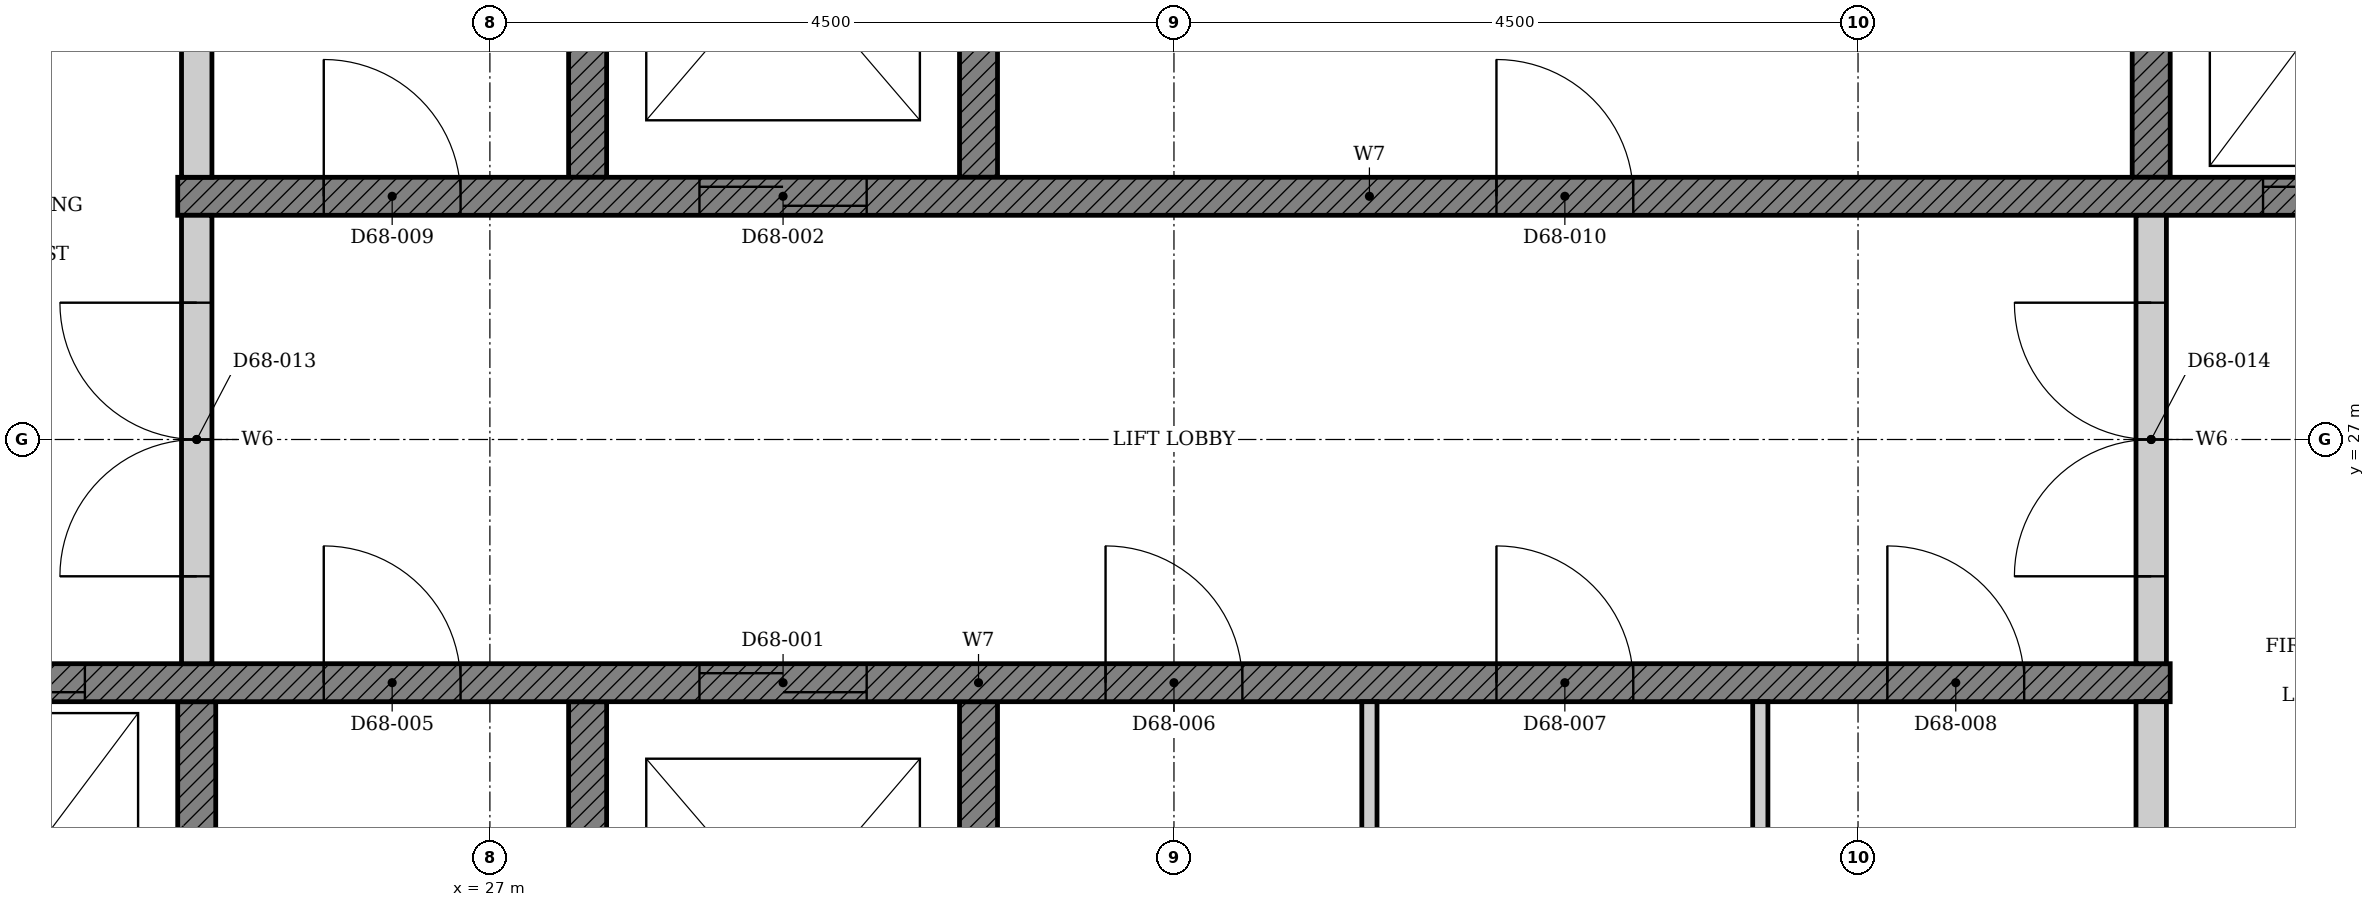
"""IFC4 building model, lengths in metres.
Left out: names, types, materials, properties, quantities, classifications, styles, units other than length and angle.
Written with IfcOpenShell. Run it as: python <this file> out.ifc"""

import sys

from ifc_helpers import new_model, si_unit, direction, frame, frame_2d, origin, place, context, subcontext, project, spatial, polyline, rectangle, outline, extrude, element, fill, save


model = new_model("IFC4")
c1 = context("Model", 3, precision=1e-05, world=origin(), true_north=direction((0.0, 1.0)))
c2 = subcontext(c1, "Body", "Model", "MODEL_VIEW")
j1 = project(units=[si_unit("LENGTHUNIT", "METRE"), si_unit("PLANEANGLEUNIT", "RADIAN")], contexts=[c1])
p1 = place(None, origin())
s1 = spatial("IfcSite", under=j1, at=p1, CompositionType="ELEMENT")
p2 = place(p1, origin())
s2 = spatial("IfcBuilding", under=s1, at=p2, CompositionType="ELEMENT")
p3 = place(p2, frame((0.0, 0.0, 267.5)))
s3 = spatial("IfcBuildingStorey", under=s2, at=p3, CompositionType="ELEMENT", Elevation=267.5)
p4 = place(p3, origin())
e1 = element("IfcWall", 1, at=p4, inside=s3, PredefinedType="SHEAR", context=c2, shape_type="SweptSolid", body=[
    extrude(outline(polyline([(22.375, 22.35), (25.197, 22.35), (25.197, 25.275), (24.947, 25.275), (24.947, 22.65), (22.625, 22.65), (22.625, 25.275), (22.375, 25.275), (22.375, 22.35)])), origin(), (0.0, 0.0, 1.0), 3.4),
])
p5 = place(p3, origin())
e2 = element("IfcWall", 2, at=p5, inside=s3, PredefinedType="SHEAR", context=c2, shape_type="SweptSolid", body=[
    extrude(outline(polyline([(27.518, 22.35), (30.339, 22.35), (30.339, 25.275), (30.089, 25.275), (30.089, 22.65), (27.768, 22.65), (27.768, 25.275), (27.518, 25.275), (27.518, 22.35)])), origin(), (0.0, 0.0, 1.0), 3.4),
])
p6 = place(p3, origin())
e3 = element("IfcWall", 3, at=p6, inside=s3, PredefinedType="SHEAR", context=c2, shape_type="SweptSolid", body=[
    extrude(outline(polyline([(27.518, 28.725), (27.768, 28.725), (27.768, 31.35), (30.089, 31.35), (30.089, 28.725), (30.339, 28.725), (30.339, 31.65), (27.518, 31.65), (27.518, 28.725)])), origin(), (0.0, 0.0, 1.0), 3.4),
])
p7 = place(p3, origin())
e4 = element("IfcWall", 4, at=p7, inside=s3, PredefinedType="SHEAR", context=c2, shape_type="SweptSolid", body=[
    extrude(outline(polyline([(37.803, 28.725), (38.053, 28.725), (38.053, 31.35), (40.375, 31.35), (40.375, 28.725), (40.625, 28.725), (40.625, 31.65), (37.803, 31.65), (37.803, 28.725)])), origin(), (0.0, 0.0, 1.0), 3.4),
])
p8 = place(p3, frame((22.375, 25.4, 0.0), z_axis=(0.0, 0.0, 1.0), x_axis=(1.0, 0.0, 0.0)))
e5 = element("IfcWall", 5, at=p8, inside=s3, PredefinedType="SHEAR", context=c2, shape_type="SweptSolid", body=[
    extrude(rectangle(XDim=15.678, YDim=0.25, at=frame_2d((7.839, 0.0))), origin(), (0.0, 0.0, 1.0), 3.4),
])
p9 = place(p8, frame((6.004, 0.0, 0.0)))
e6 = element("IfcOpeningElement", 6, at=p9, cuts=e5, PredefinedType="OPENING", context=c2, shape_type="SweptSolid", body=[
    extrude(rectangle(XDim=1.1, YDim=2.1, at=frame_2d((0.55, 1.05))), frame((0.0, 0.135, 0.0), z_axis=(0.0, -1.0, 0.0), x_axis=(1.0, 0.0, 0.0)), (0.0, 0.0, 1.0), 0.27),
])
p10 = place(p8, frame((0.861, 0.0, 0.0)))
e7 = element("IfcOpeningElement", 7, at=p10, cuts=e5, PredefinedType="OPENING", context=c2, shape_type="SweptSolid", body=[
    extrude(rectangle(XDim=1.1, YDim=2.1, at=frame_2d((0.55, 1.05))), frame((0.0, 0.135, 0.0), z_axis=(0.0, -1.0, 0.0), x_axis=(1.0, 0.0, 0.0)), (0.0, 0.0, 1.0), 0.27),
])
p11 = place(p8, frame((3.532, 0.0, 0.0)))
e8 = element("IfcOpeningElement", 8, at=p11, cuts=e5, PredefinedType="OPENING", context=c2, shape_type="SweptSolid", body=[
    extrude(rectangle(XDim=0.9, YDim=2.1, at=frame_2d((0.45, 1.05))), frame((0.0, 0.135, 0.0), z_axis=(0.0, -1.0, 0.0), x_axis=(1.0, 0.0, 0.0)), (0.0, 0.0, 1.0), 0.27),
])
p12 = place(p8, frame((8.675, 0.0, 0.0)))
e9 = element("IfcOpeningElement", 9, at=p12, cuts=e5, PredefinedType="OPENING", context=c2, shape_type="SweptSolid", body=[
    extrude(rectangle(XDim=0.9, YDim=2.1, at=frame_2d((0.45, 1.05))), frame((0.0, 0.135, 0.0), z_axis=(0.0, -1.0, 0.0), x_axis=(1.0, 0.0, 0.0)), (0.0, 0.0, 1.0), 0.27),
])
p13 = place(p8, frame((11.246, 0.0, 0.0)))
e10 = element("IfcOpeningElement", 10, at=p13, cuts=e5, PredefinedType="OPENING", context=c2, shape_type="SweptSolid", body=[
    extrude(rectangle(XDim=0.9, YDim=2.1, at=frame_2d((0.45, 1.05))), frame((0.0, 0.135, 0.0), z_axis=(0.0, -1.0, 0.0), x_axis=(1.0, 0.0, 0.0)), (0.0, 0.0, 1.0), 0.27),
])
p14 = place(p8, frame((13.818, 0.0, 0.0)))
e11 = element("IfcOpeningElement", 11, at=p14, cuts=e5, PredefinedType="OPENING", context=c2, shape_type="SweptSolid", body=[
    extrude(rectangle(XDim=0.9, YDim=2.1, at=frame_2d((0.45, 1.05))), frame((0.0, 0.135, 0.0), z_axis=(0.0, -1.0, 0.0), x_axis=(1.0, 0.0, 0.0)), (0.0, 0.0, 1.0), 0.27),
])
p15 = place(p3, frame((24.947, 28.6, 0.0), z_axis=(0.0, 0.0, 1.0), x_axis=(1.0, 0.0, 0.0)))
e12 = element("IfcWall", 12, at=p15, inside=s3, PredefinedType="SHEAR", context=c2, shape_type="SweptSolid", body=[
    extrude(rectangle(XDim=15.678, YDim=0.25, at=frame_2d((7.839, 0.0))), origin(), (0.0, 0.0, 1.0), 3.4),
])
p16 = place(p15, frame((3.432, 0.0, 0.0)))
e13 = element("IfcOpeningElement", 13, at=p16, cuts=e12, PredefinedType="OPENING", context=c2, shape_type="SweptSolid", body=[
    extrude(rectangle(XDim=1.1, YDim=2.1, at=frame_2d((0.55, 1.05))), frame((0.0, 0.135, 0.0), z_axis=(0.0, -1.0, 0.0), x_axis=(1.0, 0.0, 0.0)), (0.0, 0.0, 1.0), 0.27),
])
p17 = place(p15, frame((13.718, 0.0, 0.0)))
e14 = element("IfcOpeningElement", 14, at=p17, cuts=e12, PredefinedType="OPENING", context=c2, shape_type="SweptSolid", body=[
    extrude(rectangle(XDim=1.1, YDim=2.1, at=frame_2d((0.55, 1.05))), frame((0.0, 0.135, 0.0), z_axis=(0.0, -1.0, 0.0), x_axis=(1.0, 0.0, 0.0)), (0.0, 0.0, 1.0), 0.27),
])
p18 = place(p15, frame((0.961, 0.0, 0.0)))
e15 = element("IfcOpeningElement", 15, at=p18, cuts=e12, PredefinedType="OPENING", context=c2, shape_type="SweptSolid", body=[
    extrude(rectangle(XDim=0.9, YDim=2.1, at=frame_2d((0.45, 1.05))), frame((0.0, 0.135, 0.0), z_axis=(0.0, -1.0, 0.0), x_axis=(1.0, 0.0, 0.0)), (0.0, 0.0, 1.0), 0.27),
])
p19 = place(p15, frame((8.675, 0.0, 0.0)))
e16 = element("IfcOpeningElement", 16, at=p19, cuts=e12, PredefinedType="OPENING", context=c2, shape_type="SweptSolid", body=[
    extrude(rectangle(XDim=0.9, YDim=2.1, at=frame_2d((0.45, 1.05))), frame((0.0, 0.135, 0.0), z_axis=(0.0, -1.0, 0.0), x_axis=(1.0, 0.0, 0.0)), (0.0, 0.0, 1.0), 0.27),
])
p20 = place(p3, frame((37.928, 22.65, 0.0), z_axis=(0.0, 0.0, 1.0), x_axis=(0.0, 1.0, 0.0)))
e17 = element("IfcWall", 17, at=p20, inside=s3, PredefinedType="PARTITIONING", context=c2, shape_type="SweptSolid", body=[
    extrude(rectangle(XDim=2.625, YDim=0.2, at=frame_2d((1.312, 0.0))), origin(), (0.0, 0.0, 1.0), 3.4),
])
for number, where, z_axis, x_axis in (
    (18, (32.786, 22.65, 0.0), (0.0, 0.0, 1.0), (0.0, 1.0, 0.0)),
    (19, (35.357, 22.65, 0.0), (0.0, 0.0, 1.0), (0.0, 1.0, 0.0)),
):
    element("IfcWall", number, at=place(p3, frame(where, z_axis=z_axis, x_axis=x_axis)), inside=s3, PredefinedType="PARTITIONING", context=c2, shape_type="SweptSolid", body=[
        extrude(rectangle(XDim=2.625, YDim=0.1, at=frame_2d((1.312, 0.0))), origin(), (0.0, 0.0, 1.0), 3.4),
    ])
p21 = place(p3, frame((25.072, 28.725, 0.0), z_axis=(0.0, 0.0, 1.0), x_axis=(0.0, 1.0, 0.0)))
e20 = element("IfcWall", 20, at=p21, inside=s3, PredefinedType="PARTITIONING", context=c2, shape_type="SweptSolid", body=[
    extrude(rectangle(XDim=2.625, YDim=0.2, at=frame_2d((1.312, 0.0))), origin(), (0.0, 0.0, 1.0), 3.4),
])
p22 = place(p3, frame((25.072, 25.525, 0.0), z_axis=(0.0, 0.0, 1.0), x_axis=(0.0, 1.0, 0.0)))
e21 = element("IfcWall", 21, at=p22, inside=s3, PredefinedType="PARTITIONING", context=c2, shape_type="SweptSolid", body=[
    extrude(rectangle(XDim=2.95, YDim=0.2, at=frame_2d((1.475, 0.0))), origin(), (0.0, 0.0, 1.0), 3.4),
])
p23 = place(p22, frame((0.575, 0.0, 0.0)))
e22 = element("IfcOpeningElement", 22, at=p23, cuts=e21, PredefinedType="OPENING", context=c2, shape_type="SweptSolid", body=[
    extrude(rectangle(XDim=1.8, YDim=2.1, at=frame_2d((0.9, 1.05))), frame((0.0, 0.11, 0.0), z_axis=(0.0, -1.0, 0.0), x_axis=(1.0, 0.0, 0.0)), (0.0, 0.0, 1.0), 0.22),
])
p24 = place(p3, frame((37.928, 25.525, 0.0), z_axis=(0.0, 0.0, 1.0), x_axis=(0.0, 1.0, 0.0)))
e23 = element("IfcWall", 23, at=p24, inside=s3, PredefinedType="PARTITIONING", context=c2, shape_type="SweptSolid", body=[
    extrude(rectangle(XDim=2.95, YDim=0.2, at=frame_2d((1.475, 0.0))), origin(), (0.0, 0.0, 1.0), 3.4),
])
p25 = place(p24, frame((0.575, 0.0, 0.0)))
e24 = element("IfcOpeningElement", 24, at=p25, cuts=e23, PredefinedType="OPENING", context=c2, shape_type="SweptSolid", body=[
    extrude(rectangle(XDim=1.8, YDim=2.1, at=frame_2d((0.9, 1.05))), frame((0.0, 0.11, 0.0), z_axis=(0.0, -1.0, 0.0), x_axis=(1.0, 0.0, 0.0)), (0.0, 0.0, 1.0), 0.22),
])
p26 = place(p9, origin())
e25 = element("IfcDoor", 25, at=p26, inside=s3, OperationType="DOUBLE_DOOR_SLIDING", PredefinedType="DOOR", context=c2, shape_type="SweptSolid", body=[
    extrude(rectangle(XDim=1.1, YDim=2.1, at=frame_2d((0.55, 1.05))), frame((0.0, 0.025, 0.0), z_axis=(0.0, -1.0, 0.0), x_axis=(1.0, 0.0, 0.0)), (0.0, 0.0, 1.0), 0.05),
])
fill(e6, e25)
p27 = place(p16, origin())
e26 = element("IfcDoor", 26, at=p27, inside=s3, OperationType="DOUBLE_DOOR_SLIDING", PredefinedType="DOOR", context=c2, shape_type="SweptSolid", body=[
    extrude(rectangle(XDim=1.1, YDim=2.1, at=frame_2d((0.55, 1.05))), frame((0.0, 0.025, 0.0), z_axis=(0.0, -1.0, 0.0), x_axis=(1.0, 0.0, 0.0)), (0.0, 0.0, 1.0), 0.05),
])
fill(e13, e26)
p28 = place(p10, origin())
e27 = element("IfcDoor", 27, at=p28, inside=s3, OperationType="DOUBLE_DOOR_SLIDING", PredefinedType="DOOR", context=c2, shape_type="SweptSolid", body=[
    extrude(rectangle(XDim=1.1, YDim=2.1, at=frame_2d((0.55, 1.05))), frame((0.0, 0.025, 0.0), z_axis=(0.0, -1.0, 0.0), x_axis=(1.0, 0.0, 0.0)), (0.0, 0.0, 1.0), 0.05),
])
fill(e7, e27)
p29 = place(p17, origin())
e28 = element("IfcDoor", 28, at=p29, inside=s3, OperationType="DOUBLE_DOOR_SLIDING", PredefinedType="DOOR", context=c2, shape_type="SweptSolid", body=[
    extrude(rectangle(XDim=1.1, YDim=2.1, at=frame_2d((0.55, 1.05))), frame((0.0, 0.025, 0.0), z_axis=(0.0, -1.0, 0.0), x_axis=(1.0, 0.0, 0.0)), (0.0, 0.0, 1.0), 0.05),
])
fill(e14, e28)
p30 = place(p11, origin())
e29 = element("IfcDoor", 29, at=p30, inside=s3, OperationType="SINGLE_SWING_LEFT", PredefinedType="DOOR", context=c2, shape_type="SweptSolid", body=[
    extrude(rectangle(XDim=0.9, YDim=2.1, at=frame_2d((0.45, 1.05))), frame((0.0, 0.025, 0.0), z_axis=(0.0, -1.0, 0.0), x_axis=(1.0, 0.0, 0.0)), (0.0, 0.0, 1.0), 0.05),
])
fill(e8, e29)
p31 = place(p12, origin())
e30 = element("IfcDoor", 30, at=p31, inside=s3, OperationType="SINGLE_SWING_LEFT", PredefinedType="DOOR", context=c2, shape_type="SweptSolid", body=[
    extrude(rectangle(XDim=0.9, YDim=2.1, at=frame_2d((0.45, 1.05))), frame((0.0, 0.025, 0.0), z_axis=(0.0, -1.0, 0.0), x_axis=(1.0, 0.0, 0.0)), (0.0, 0.0, 1.0), 0.05),
])
fill(e9, e30)
p32 = place(p13, origin())
e31 = element("IfcDoor", 31, at=p32, inside=s3, OperationType="SINGLE_SWING_LEFT", PredefinedType="DOOR", context=c2, shape_type="SweptSolid", body=[
    extrude(rectangle(XDim=0.9, YDim=2.1, at=frame_2d((0.45, 1.05))), frame((0.0, 0.025, 0.0), z_axis=(0.0, -1.0, 0.0), x_axis=(1.0, 0.0, 0.0)), (0.0, 0.0, 1.0), 0.05),
])
fill(e10, e31)
p33 = place(p14, origin())
e32 = element("IfcDoor", 32, at=p33, inside=s3, OperationType="SINGLE_SWING_LEFT", PredefinedType="DOOR", context=c2, shape_type="SweptSolid", body=[
    extrude(rectangle(XDim=0.9, YDim=2.1, at=frame_2d((0.45, 1.05))), frame((0.0, 0.025, 0.0), z_axis=(0.0, -1.0, 0.0), x_axis=(1.0, 0.0, 0.0)), (0.0, 0.0, 1.0), 0.05),
])
fill(e11, e32)
p34 = place(p18, origin())
e33 = element("IfcDoor", 33, at=p34, inside=s3, OperationType="SINGLE_SWING_LEFT", PredefinedType="DOOR", context=c2, shape_type="SweptSolid", body=[
    extrude(rectangle(XDim=0.9, YDim=2.1, at=frame_2d((0.45, 1.05))), frame((0.0, 0.025, 0.0), z_axis=(0.0, -1.0, 0.0), x_axis=(1.0, 0.0, 0.0)), (0.0, 0.0, 1.0), 0.05),
])
fill(e15, e33)
p35 = place(p19, origin())
e34 = element("IfcDoor", 34, at=p35, inside=s3, OperationType="SINGLE_SWING_LEFT", PredefinedType="DOOR", context=c2, shape_type="SweptSolid", body=[
    extrude(rectangle(XDim=0.9, YDim=2.1, at=frame_2d((0.45, 1.05))), frame((0.0, 0.025, 0.0), z_axis=(0.0, -1.0, 0.0), x_axis=(1.0, 0.0, 0.0)), (0.0, 0.0, 1.0), 0.05),
])
fill(e16, e34)
p36 = place(p23, origin())
e35 = element("IfcDoor", 35, at=p36, inside=s3, OperationType="DOUBLE_DOOR_SINGLE_SWING", PredefinedType="DOOR", context=c2, shape_type="SweptSolid", body=[
    extrude(rectangle(XDim=1.8, YDim=2.1, at=frame_2d((0.9, 1.05))), frame((0.0, 0.025, 0.0), z_axis=(0.0, -1.0, 0.0), x_axis=(1.0, 0.0, 0.0)), (0.0, 0.0, 1.0), 0.05),
])
fill(e22, e35)
p37 = place(p25, origin())
e36 = element("IfcDoor", 36, at=p37, inside=s3, OperationType="DOUBLE_DOOR_SINGLE_SWING", PredefinedType="DOOR", context=c2, shape_type="SweptSolid", body=[
    extrude(rectangle(XDim=1.8, YDim=2.1, at=frame_2d((0.9, 1.05))), frame((0.0, 0.025, 0.0), z_axis=(0.0, -1.0, 0.0), x_axis=(1.0, 0.0, 0.0)), (0.0, 0.0, 1.0), 0.05),
])
fill(e24, e36)
save(model, sys.argv[1])
